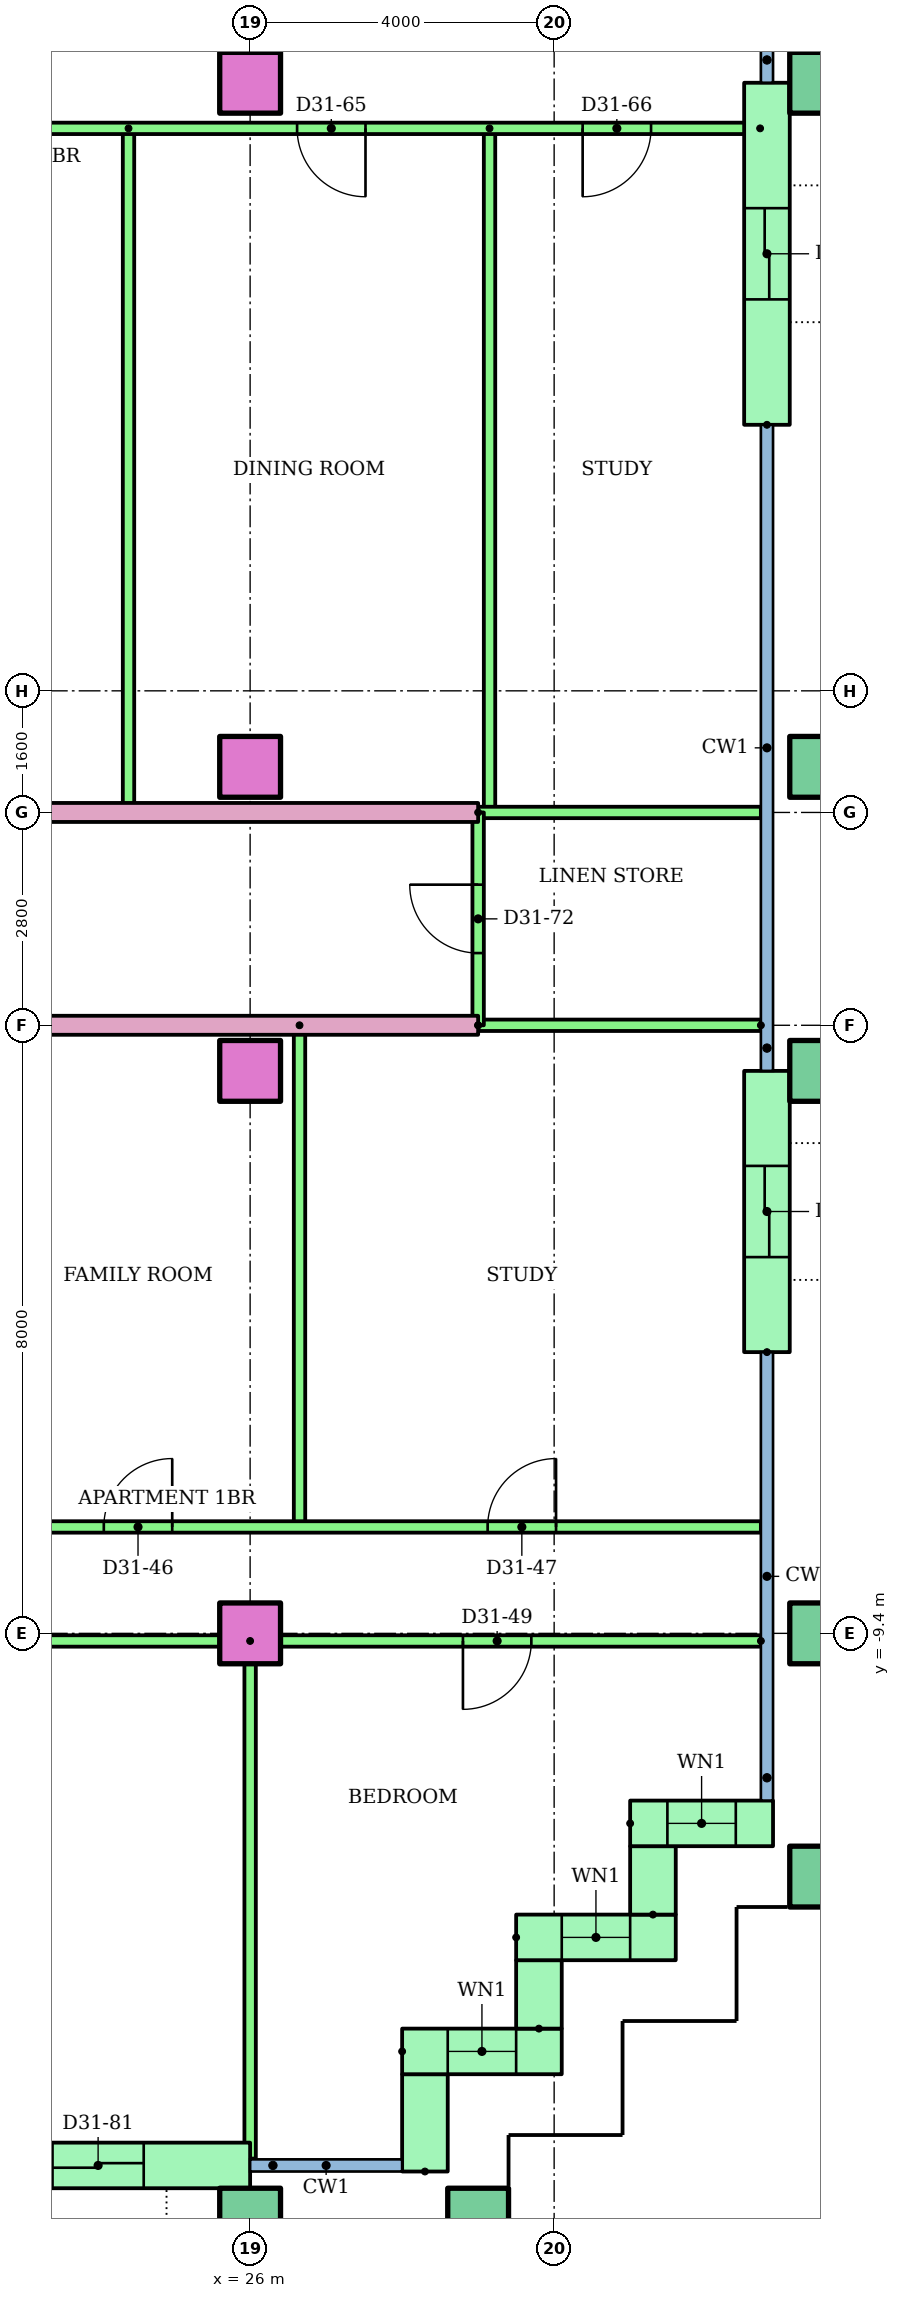
"""IFC4 building model, lengths in metres.
Left out: names, types, materials, properties, quantities, classifications, styles, units other than length and angle.
Written with IfcOpenShell. Run it as: python <this file> out.ifc"""

import sys

from ifc_helpers import new_model, si_unit, direction, frame, frame_2d, origin, origin_2d, place, context, subcontext, project, spatial, rectangle, hollow_rectangle, extrude, element, fill, save


model = new_model("IFC4")
c1 = context("Model", 3, precision=1e-05, world=origin(), true_north=direction((0.0, 1.0)))
c2 = subcontext(c1, "Body", "Model", "MODEL_VIEW")
j1 = project(units=[si_unit("LENGTHUNIT", "METRE"), si_unit("PLANEANGLEUNIT", "RADIAN")], contexts=[c1])
p1 = place(None, origin())
s1 = spatial("IfcSite", under=j1, at=p1, CompositionType="ELEMENT")
p2 = place(p1, origin())
s2 = spatial("IfcBuilding", under=s1, at=p2, CompositionType="ELEMENT")
p3 = place(p2, frame((0.0, 0.0, 123.0)))
s3 = spatial("IfcBuildingStorey", under=s2, at=p3, CompositionType="ELEMENT", Elevation=123.0)
for number, where in (
    (1, (26.0, -17.1, 0.0)),
    (2, (29.0, -17.1, 0.0)),
    (3, (33.5, -12.6, 0.0)),
):
    element("IfcColumn", number, at=place(p3, frame(where)), inside=s3, PredefinedType="COLUMN", context=c2, shape_type="SweptSolid", body=[
        extrude(hollow_rectangle(XDim=0.8, YDim=0.8, WallThickness=0.04, at=origin_2d()), origin(), (0.0, 0.0, 1.0), 3.2),
    ])
p4 = place(p3, frame((26.0, -9.4, 0.0)))
e4 = element("IfcColumn", 4, at=p4, inside=s3, PredefinedType="COLUMN", context=c2, shape_type="SweptSolid", body=[
    extrude(rectangle(XDim=0.8, YDim=0.8, at=origin_2d()), origin(), (0.0, 0.0, 1.0), 3.2),
])
p5 = place(p3, frame((33.5, -9.4, 0.0)))
e5 = element("IfcColumn", 5, at=p5, inside=s3, PredefinedType="COLUMN", context=c2, shape_type="SweptSolid", body=[
    extrude(hollow_rectangle(XDim=0.8, YDim=0.8, WallThickness=0.04, at=origin_2d()), origin(), (0.0, 0.0, 1.0), 3.2),
])
p6 = place(p3, frame((26.0, -2.0, 0.0)))
e6 = element("IfcColumn", 6, at=p6, inside=s3, PredefinedType="COLUMN", context=c2, shape_type="SweptSolid", body=[
    extrude(rectangle(XDim=0.8, YDim=0.8, at=origin_2d()), origin(), (0.0, 0.0, 1.0), 3.2),
])
p7 = place(p3, frame((33.5, -2.0, 0.0)))
e7 = element("IfcColumn", 7, at=p7, inside=s3, PredefinedType="COLUMN", context=c2, shape_type="SweptSolid", body=[
    extrude(hollow_rectangle(XDim=0.8, YDim=0.8, WallThickness=0.04, at=origin_2d()), origin(), (0.0, 0.0, 1.0), 3.2),
])
p8 = place(p3, frame((26.0, 2.0, 0.0)))
e8 = element("IfcColumn", 8, at=p8, inside=s3, PredefinedType="COLUMN", context=c2, shape_type="SweptSolid", body=[
    extrude(rectangle(XDim=0.8, YDim=0.8, at=origin_2d()), origin(), (0.0, 0.0, 1.0), 3.2),
])
p9 = place(p3, frame((33.5, 2.0, 0.0)))
e9 = element("IfcColumn", 9, at=p9, inside=s3, PredefinedType="COLUMN", context=c2, shape_type="SweptSolid", body=[
    extrude(hollow_rectangle(XDim=0.8, YDim=0.8, WallThickness=0.04, at=origin_2d()), origin(), (0.0, 0.0, 1.0), 3.2),
])
p10 = place(p3, frame((26.0, 11.0, 0.0)))
e10 = element("IfcColumn", 10, at=p10, inside=s3, PredefinedType="COLUMN", context=c2, shape_type="SweptSolid", body=[
    extrude(rectangle(XDim=0.8, YDim=0.8, at=origin_2d()), origin(), (0.0, 0.0, 1.0), 3.2),
])
p11 = place(p3, frame((33.5, 11.0, 0.0)))
e11 = element("IfcColumn", 11, at=p11, inside=s3, PredefinedType="COLUMN", context=c2, shape_type="SweptSolid", body=[
    extrude(hollow_rectangle(XDim=0.8, YDim=0.8, WallThickness=0.04, at=origin_2d()), origin(), (0.0, 0.0, 1.0), 3.2),
])
p12 = place(p3, frame((22.0, -16.4, 0.0)))
e12 = element("IfcWall", 12, at=p12, inside=s3, PredefinedType="STANDARD", context=c2, shape_type="SweptSolid", body=[
    extrude(rectangle(XDim=4.0, YDim=0.6, at=frame_2d((2.0, 0.0))), origin(), (0.0, 0.0, 1.0), 2.92),
])
p13 = place(p12, frame((1.4, 0.0, 0.0)))
e13 = element("IfcOpeningElement", 13, at=p13, cuts=e12, PredefinedType="OPENING", context=c2, shape_type="SweptSolid", body=[
    extrude(rectangle(XDim=1.2, YDim=2.1, at=frame_2d((0.6, 1.05))), frame((0.0, 0.31, 0.0), z_axis=(0.0, -1.0, 0.0), x_axis=(1.0, 0.0, 0.0)), (0.0, 0.0, 1.0), 0.62),
])
p14 = place(p3, frame((28.3, -16.48, 0.0), z_axis=(0.0, 0.0, 1.0), x_axis=(0.0, 1.0, 0.0)))
e14 = element("IfcWall", 14, at=p14, inside=s3, PredefinedType="STANDARD", context=c2, shape_type="SweptSolid", body=[
    extrude(rectangle(XDim=1.28, YDim=0.6, at=frame_2d((0.64, 0.0))), origin(), (0.0, 0.0, 1.0), 2.92),
])
p15 = place(p3, frame((28.0, -14.9, 0.0)))
e15 = element("IfcWall", 15, at=p15, inside=s3, PredefinedType="STANDARD", context=c2, shape_type="SweptSolid", body=[
    extrude(rectangle(XDim=2.1, YDim=0.6, at=frame_2d((1.05, 0.0))), origin(), (0.0, 0.0, 1.0), 2.92),
])
p16 = place(p15, frame((0.6, 0.0, 0.9)))
e16 = element("IfcOpeningElement", 16, at=p16, cuts=e15, PredefinedType="OPENING", context=c2, shape_type="SweptSolid", body=[
    extrude(rectangle(XDim=0.9, YDim=1.5, at=frame_2d((0.45, 0.75))), frame((0.0, 0.31, 0.0), z_axis=(0.0, -1.0, 0.0), x_axis=(1.0, 0.0, 0.0)), (0.0, 0.0, 1.0), 0.62),
])
p17 = place(p3, frame((29.8, -14.6, 0.0), z_axis=(0.0, 0.0, 1.0), x_axis=(0.0, 1.0, 0.0)))
e17 = element("IfcWall", 17, at=p17, inside=s3, PredefinedType="STANDARD", context=c2, shape_type="SweptSolid", body=[
    extrude(rectangle(XDim=0.9, YDim=0.6, at=frame_2d((0.45, 0.0))), origin(), (0.0, 0.0, 1.0), 2.92),
])
p18 = place(p3, frame((29.5, -13.4, 0.0)))
e18 = element("IfcWall", 18, at=p18, inside=s3, PredefinedType="STANDARD", context=c2, shape_type="SweptSolid", body=[
    extrude(rectangle(XDim=2.1, YDim=0.6, at=frame_2d((1.05, 0.0))), origin(), (0.0, 0.0, 1.0), 2.92),
])
p19 = place(p18, frame((0.6, 0.0, 0.9)))
e19 = element("IfcOpeningElement", 19, at=p19, cuts=e18, PredefinedType="OPENING", context=c2, shape_type="SweptSolid", body=[
    extrude(rectangle(XDim=0.9, YDim=1.5, at=frame_2d((0.45, 0.75))), frame((0.0, 0.31, 0.0), z_axis=(0.0, -1.0, 0.0), x_axis=(1.0, 0.0, 0.0)), (0.0, 0.0, 1.0), 0.62),
])
p20 = place(p3, frame((31.3, -13.1, 0.0), z_axis=(0.0, 0.0, 1.0), x_axis=(0.0, 1.0, 0.0)))
e20 = element("IfcWall", 20, at=p20, inside=s3, PredefinedType="STANDARD", context=c2, shape_type="SweptSolid", body=[
    extrude(rectangle(XDim=0.9, YDim=0.6, at=frame_2d((0.45, 0.0))), origin(), (0.0, 0.0, 1.0), 2.92),
])
p21 = place(p3, frame((31.0, -11.9, 0.0)))
e21 = element("IfcWall", 21, at=p21, inside=s3, PredefinedType="STANDARD", context=c2, shape_type="SweptSolid", body=[
    extrude(rectangle(XDim=1.88, YDim=0.6, at=frame_2d((0.94, 0.0))), origin(), (0.0, 0.0, 1.0), 2.92),
])
p22 = place(p21, frame((0.49, 0.0, 0.9)))
e22 = element("IfcOpeningElement", 22, at=p22, cuts=e21, PredefinedType="OPENING", context=c2, shape_type="SweptSolid", body=[
    extrude(rectangle(XDim=0.9, YDim=1.5, at=frame_2d((0.45, 0.75))), frame((0.0, 0.31, 0.0), z_axis=(0.0, -1.0, 0.0), x_axis=(1.0, 0.0, 0.0)), (0.0, 0.0, 1.0), 0.62),
])
p23 = place(p3, frame((32.8, -5.7, 0.0), z_axis=(0.0, 0.0, 1.0), x_axis=(0.0, 1.0, 0.0)))
e23 = element("IfcWall", 23, at=p23, inside=s3, PredefinedType="STANDARD", context=c2, shape_type="SweptSolid", body=[
    extrude(rectangle(XDim=3.7, YDim=0.6, at=frame_2d((1.85, 0.0))), origin(), (0.0, 0.0, 1.0), 2.92),
])
p24 = place(p23, frame((1.25, 0.0, 0.0)))
e24 = element("IfcOpeningElement", 24, at=p24, cuts=e23, PredefinedType="OPENING", context=c2, shape_type="SweptSolid", body=[
    extrude(rectangle(XDim=1.2, YDim=2.1, at=frame_2d((0.6, 1.05))), frame((0.0, 0.31, 0.0), z_axis=(0.0, -1.0, 0.0), x_axis=(1.0, 0.0, 0.0)), (0.0, 0.0, 1.0), 0.62),
])
p25 = place(p3, frame((32.8, 6.5, 0.0), z_axis=(0.0, 0.0, 1.0), x_axis=(0.0, 1.0, 0.0)))
e25 = element("IfcWall", 25, at=p25, inside=s3, PredefinedType="STANDARD", context=c2, shape_type="SweptSolid", body=[
    extrude(rectangle(XDim=4.5, YDim=0.6, at=frame_2d((2.25, 0.0))), origin(), (0.0, 0.0, 1.0), 2.92),
])
p26 = place(p25, frame((1.65, 0.0, 0.0)))
e26 = element("IfcOpeningElement", 26, at=p26, cuts=e25, PredefinedType="OPENING", context=c2, shape_type="SweptSolid", body=[
    extrude(rectangle(XDim=1.2, YDim=2.1, at=frame_2d((0.6, 1.05))), frame((0.0, 0.31, 0.0), z_axis=(0.0, -1.0, 0.0), x_axis=(1.0, 0.0, 0.0)), (0.0, 0.0, 1.0), 0.62),
])
p27 = place(p3, frame((26.65, -1.4, 0.0), z_axis=(0.0, 0.0, 1.0), x_axis=(0.0, -1.0, 0.0)))
e27 = element("IfcWall", 27, at=p27, inside=s3, PredefinedType="PARTITIONING", context=c2, shape_type="SweptSolid", body=[
    extrude(rectangle(XDim=6.6, YDim=0.15, at=frame_2d((3.3, 0.0))), origin(), (0.0, 0.0, 1.0), 2.4),
])
p28 = place(p3, frame((20.0, -8.0, 0.0)))
e28 = element("IfcWall", 28, at=p28, inside=s3, PredefinedType="PARTITIONING", context=c2, shape_type="SweptSolid", body=[
    extrude(rectangle(XDim=12.72, YDim=0.15, at=frame_2d((6.36, 0.0))), origin(), (0.0, 0.0, 1.0), 2.4),
])
p29 = place(p28, frame((4.075, 0.0, 0.0)))
e29 = element("IfcOpeningElement", 29, at=p29, cuts=e28, PredefinedType="OPENING", context=c2, shape_type="SweptSolid", body=[
    extrude(rectangle(XDim=0.9, YDim=2.1, at=frame_2d((0.45, 1.05))), frame((0.0, 0.085, 0.0), z_axis=(0.0, -1.0, 0.0), x_axis=(1.0, 0.0, 0.0)), (0.0, 0.0, 1.0), 0.17),
])
p30 = place(p28, frame((9.125, 0.0, 0.0)))
e30 = element("IfcOpeningElement", 30, at=p30, cuts=e28, PredefinedType="OPENING", context=c2, shape_type="SweptSolid", body=[
    extrude(rectangle(XDim=0.9, YDim=2.1, at=frame_2d((0.45, 1.05))), frame((0.0, 0.085, 0.0), z_axis=(0.0, -1.0, 0.0), x_axis=(1.0, 0.0, 0.0)), (0.0, 0.0, 1.0), 0.17),
])
p31 = place(p3, frame((32.72, -9.5, 0.0), z_axis=(0.0, 0.0, 1.0), x_axis=(-1.0, 0.0, 0.0)))
e31 = element("IfcWall", 31, at=p31, inside=s3, PredefinedType="PARTITIONING", context=c2, shape_type="SweptSolid", body=[
    extrude(rectangle(XDim=14.72, YDim=0.15, at=frame_2d((7.36, 0.0))), origin(), (0.0, 0.0, 1.0), 2.4),
])
p32 = place(p31, frame((10.22, 0.0, 0.0)))
e32 = element("IfcOpeningElement", 32, at=p32, cuts=e31, PredefinedType="OPENING", context=c2, shape_type="SweptSolid", body=[
    extrude(rectangle(XDim=1.0, YDim=2.1, at=frame_2d((0.5, 1.05))), frame((0.0, 0.085, 0.0), z_axis=(0.0, -1.0, 0.0), x_axis=(1.0, 0.0, 0.0)), (0.0, 0.0, 1.0), 0.17),
])
p33 = place(p31, frame((3.02, 0.0, 0.0)))
e33 = element("IfcOpeningElement", 33, at=p33, cuts=e31, PredefinedType="OPENING", context=c2, shape_type="SweptSolid", body=[
    extrude(rectangle(XDim=0.9, YDim=2.1, at=frame_2d((0.45, 1.05))), frame((0.0, 0.085, 0.0), z_axis=(0.0, -1.0, 0.0), x_axis=(1.0, 0.0, 0.0)), (0.0, 0.0, 1.0), 0.17),
])
p34 = place(p3, frame((26.0, -9.5, 0.0), z_axis=(0.0, 0.0, 1.0), x_axis=(0.0, -1.0, 0.0)))
e34 = element("IfcWall", 34, at=p34, inside=s3, PredefinedType="PARTITIONING", context=c2, shape_type="SweptSolid", body=[
    extrude(rectangle(XDim=6.81, YDim=0.15, at=frame_2d((3.405, 0.0))), origin(), (0.0, 0.0, 1.0), 2.4),
])
p35 = place(p3, frame((29.0, -1.4, 0.0), z_axis=(0.0, 0.0, 1.0), x_axis=(-1.0, 0.0, 0.0)))
e35 = element("IfcWall", 35, at=p35, inside=s3, PredefinedType="PARTITIONING", context=c2, shape_type="SweptSolid", body=[
    extrude(rectangle(XDim=15.0, YDim=0.25, at=frame_2d((7.5, 0.0))), origin(), (0.0, 0.0, 1.0), 2.4),
])
p36 = place(p35, frame((9.382, 0.0, 0.0)))
e36 = element("IfcOpeningElement", 36, at=p36, cuts=e35, PredefinedType="OPENING", context=c2, shape_type="SweptSolid", body=[
    extrude(rectangle(XDim=1.0, YDim=2.1, at=frame_2d((0.5, 1.05))), frame((0.0, 0.135, 0.0), z_axis=(0.0, -1.0, 0.0), x_axis=(1.0, 0.0, 0.0)), (0.0, 0.0, 1.0), 0.27),
])
p37 = place(p3, frame((32.72, -1.4, 0.0), z_axis=(0.0, 0.0, 1.0), x_axis=(-1.0, 0.0, 0.0)))
e37 = element("IfcWall", 37, at=p37, inside=s3, PredefinedType="PARTITIONING", context=c2, shape_type="SweptSolid", body=[
    extrude(rectangle(XDim=3.72, YDim=0.15, at=frame_2d((1.86, 0.0))), origin(), (0.0, 0.0, 1.0), 2.4),
])
for number, where, z_axis, x_axis in (
    (38, (24.4, 10.4, 0.0), (0.0, 0.0, 1.0), (0.0, -1.0, 0.0)),
    (39, (29.15, 10.4, 0.0), (0.0, 0.0, 1.0), (0.0, -1.0, 0.0)),
):
    element("IfcWall", number, at=place(p3, frame(where, z_axis=z_axis, x_axis=x_axis)), inside=s3, PredefinedType="PARTITIONING", context=c2, shape_type="SweptSolid", body=[
        extrude(rectangle(XDim=9.0, YDim=0.15, at=frame_2d((4.5, 0.0))), origin(), (0.0, 0.0, 1.0), 2.4),
    ])
p38 = place(p3, frame((32.71, 10.4, 0.0), z_axis=(0.0, 0.0, 1.0), x_axis=(-1.0, 0.0, 0.0)))
e40 = element("IfcWall", 40, at=p38, inside=s3, PredefinedType="PARTITIONING", context=c2, shape_type="SweptSolid", body=[
    extrude(rectangle(XDim=16.71, YDim=0.15, at=frame_2d((8.355, 0.0))), origin(), (0.0, 0.0, 1.0), 2.4),
])
p39 = place(p38, frame((10.86, 0.0, 0.0)))
e41 = element("IfcOpeningElement", 41, at=p39, cuts=e40, PredefinedType="OPENING", context=c2, shape_type="SweptSolid", body=[
    extrude(rectangle(XDim=0.9, YDim=2.1, at=frame_2d((0.45, 1.05))), frame((0.0, 0.085, 0.0), z_axis=(0.0, -1.0, 0.0), x_axis=(1.0, 0.0, 0.0)), (0.0, 0.0, 1.0), 0.17),
])
p40 = place(p38, frame((5.192, 0.0, 0.0)))
e42 = element("IfcOpeningElement", 42, at=p40, cuts=e40, PredefinedType="OPENING", context=c2, shape_type="SweptSolid", body=[
    extrude(rectangle(XDim=0.9, YDim=2.1, at=frame_2d((0.45, 1.05))), frame((0.0, 0.085, 0.0), z_axis=(0.0, -1.0, 0.0), x_axis=(1.0, 0.0, 0.0)), (0.0, 0.0, 1.0), 0.17),
])
p41 = place(p38, frame((1.435, 0.0, 0.0)))
e43 = element("IfcOpeningElement", 43, at=p41, cuts=e40, PredefinedType="OPENING", context=c2, shape_type="SweptSolid", body=[
    extrude(rectangle(XDim=0.9, YDim=2.1, at=frame_2d((0.45, 1.05))), frame((0.0, 0.085, 0.0), z_axis=(0.0, -1.0, 0.0), x_axis=(1.0, 0.0, 0.0)), (0.0, 0.0, 1.0), 0.17),
])
p42 = place(p3, frame((14.0, 1.4, 0.0)))
e44 = element("IfcWall", 44, at=p42, inside=s3, PredefinedType="PARTITIONING", context=c2, shape_type="SweptSolid", body=[
    extrude(rectangle(XDim=15.0, YDim=0.25, at=frame_2d((7.5, 0.0))), origin(), (0.0, 0.0, 1.0), 2.4),
])
p43 = place(p42, frame((0.5, 0.0, 0.0)))
e45 = element("IfcOpeningElement", 45, at=p43, cuts=e44, PredefinedType="OPENING", context=c2, shape_type="SweptSolid", body=[
    extrude(rectangle(XDim=1.0, YDim=2.1, at=frame_2d((0.5, 1.05))), frame((0.0, 0.135, 0.0), z_axis=(0.0, -1.0, 0.0), x_axis=(1.0, 0.0, 0.0)), (0.0, 0.0, 1.0), 0.27),
])
p44 = place(p3, frame((29.0, 1.4, 0.0)))
e46 = element("IfcWall", 46, at=p44, inside=s3, PredefinedType="PARTITIONING", context=c2, shape_type="SweptSolid", body=[
    extrude(rectangle(XDim=3.72, YDim=0.15, at=frame_2d((1.86, 0.0))), origin(), (0.0, 0.0, 1.0), 2.4),
])
p45 = place(p3, frame((29.0, -1.4, 0.0), z_axis=(0.0, 0.0, 1.0), x_axis=(0.0, 1.0, 0.0)))
e47 = element("IfcWall", 47, at=p45, inside=s3, PredefinedType="PARTITIONING", context=c2, shape_type="SweptSolid", body=[
    extrude(rectangle(XDim=2.8, YDim=0.15, at=frame_2d((1.4, 0.0))), origin(), (0.0, 0.0, 1.0), 2.4),
])
p46 = place(p45, frame((0.95, 0.0, 0.0)))
e48 = element("IfcOpeningElement", 48, at=p46, cuts=e47, PredefinedType="OPENING", context=c2, shape_type="SweptSolid", body=[
    extrude(rectangle(XDim=0.9, YDim=2.1, at=frame_2d((0.45, 1.05))), frame((0.0, 0.085, 0.0), z_axis=(0.0, -1.0, 0.0), x_axis=(1.0, 0.0, 0.0)), (0.0, 0.0, 1.0), 0.17),
])
p47 = place(p16, origin())
e49 = element("IfcWindow", 49, at=p47, inside=s3, PartitioningType="SINGLE_PANEL", PredefinedType="WINDOW", context=c2, shape_type="SweptSolid", body=[
    extrude(rectangle(XDim=0.9, YDim=1.5, at=frame_2d((0.45, 0.75))), frame((0.0, 0.03, 0.0), z_axis=(0.0, -1.0, 0.0), x_axis=(1.0, 0.0, 0.0)), (0.0, 0.0, 1.0), 0.06),
])
fill(e16, e49)
p48 = place(p19, origin())
e50 = element("IfcWindow", 50, at=p48, inside=s3, PartitioningType="SINGLE_PANEL", PredefinedType="WINDOW", context=c2, shape_type="SweptSolid", body=[
    extrude(rectangle(XDim=0.9, YDim=1.5, at=frame_2d((0.45, 0.75))), frame((0.0, 0.03, 0.0), z_axis=(0.0, -1.0, 0.0), x_axis=(1.0, 0.0, 0.0)), (0.0, 0.0, 1.0), 0.06),
])
fill(e19, e50)
p49 = place(p22, origin())
e51 = element("IfcWindow", 51, at=p49, inside=s3, PartitioningType="SINGLE_PANEL", PredefinedType="WINDOW", context=c2, shape_type="SweptSolid", body=[
    extrude(rectangle(XDim=0.9, YDim=1.5, at=frame_2d((0.45, 0.75))), frame((0.0, 0.03, 0.0), z_axis=(0.0, -1.0, 0.0), x_axis=(1.0, 0.0, 0.0)), (0.0, 0.0, 1.0), 0.06),
])
fill(e22, e51)
p50 = place(p29, origin())
e52 = element("IfcDoor", 52, at=p50, inside=s3, OperationType="SINGLE_SWING_RIGHT", PredefinedType="DOOR", context=c2, shape_type="SweptSolid", body=[
    extrude(rectangle(XDim=0.9, YDim=2.1, at=frame_2d((0.45, 1.05))), frame((0.0, 0.025, 0.0), z_axis=(0.0, -1.0, 0.0), x_axis=(1.0, 0.0, 0.0)), (0.0, 0.0, 1.0), 0.05),
])
fill(e29, e52)
p51 = place(p30, origin())
e53 = element("IfcDoor", 53, at=p51, inside=s3, OperationType="SINGLE_SWING_RIGHT", PredefinedType="DOOR", context=c2, shape_type="SweptSolid", body=[
    extrude(rectangle(XDim=0.9, YDim=2.1, at=frame_2d((0.45, 1.05))), frame((0.0, 0.025, 0.0), z_axis=(0.0, -1.0, 0.0), x_axis=(1.0, 0.0, 0.0)), (0.0, 0.0, 1.0), 0.05),
])
fill(e30, e53)
p52 = place(p33, origin())
e54 = element("IfcDoor", 54, at=p52, inside=s3, OperationType="SINGLE_SWING_RIGHT", PredefinedType="DOOR", context=c2, shape_type="SweptSolid", body=[
    extrude(rectangle(XDim=0.9, YDim=2.1, at=frame_2d((0.45, 1.05))), frame((0.0, 0.025, 0.0), z_axis=(0.0, -1.0, 0.0), x_axis=(1.0, 0.0, 0.0)), (0.0, 0.0, 1.0), 0.05),
])
fill(e33, e54)
p53 = place(p40, origin())
e55 = element("IfcDoor", 55, at=p53, inside=s3, OperationType="SINGLE_SWING_LEFT", PredefinedType="DOOR", context=c2, shape_type="SweptSolid", body=[
    extrude(rectangle(XDim=0.9, YDim=2.1, at=frame_2d((0.45, 1.05))), frame((0.0, 0.025, 0.0), z_axis=(0.0, -1.0, 0.0), x_axis=(1.0, 0.0, 0.0)), (0.0, 0.0, 1.0), 0.05),
])
fill(e42, e55)
p54 = place(p41, origin())
e56 = element("IfcDoor", 56, at=p54, inside=s3, OperationType="SINGLE_SWING_RIGHT", PredefinedType="DOOR", context=c2, shape_type="SweptSolid", body=[
    extrude(rectangle(XDim=0.9, YDim=2.1, at=frame_2d((0.45, 1.05))), frame((0.0, 0.025, 0.0), z_axis=(0.0, -1.0, 0.0), x_axis=(1.0, 0.0, 0.0)), (0.0, 0.0, 1.0), 0.05),
])
fill(e43, e56)
p55 = place(p46, origin())
e57 = element("IfcDoor", 57, at=p55, inside=s3, OperationType="SINGLE_SWING_RIGHT", PredefinedType="DOOR", context=c2, shape_type="SweptSolid", body=[
    extrude(rectangle(XDim=0.9, YDim=2.1, at=frame_2d((0.45, 1.05))), frame((0.0, 0.025, 0.0), z_axis=(0.0, -1.0, 0.0), x_axis=(1.0, 0.0, 0.0)), (0.0, 0.0, 1.0), 0.05),
])
fill(e48, e57)
p56 = place(p13, origin())
e58 = element("IfcDoor", 58, at=p56, inside=s3, OperationType="SLIDING_TO_LEFT", PredefinedType="DOOR", context=c2, shape_type="SweptSolid", body=[
    extrude(rectangle(XDim=1.2, YDim=2.1, at=frame_2d((0.6, 1.05))), frame((0.0, 0.025, 0.0), z_axis=(0.0, -1.0, 0.0), x_axis=(1.0, 0.0, 0.0)), (0.0, 0.0, 1.0), 0.05),
])
fill(e13, e58)
p57 = place(p24, origin())
e59 = element("IfcDoor", 59, at=p57, inside=s3, OperationType="SLIDING_TO_LEFT", PredefinedType="DOOR", context=c2, shape_type="SweptSolid", body=[
    extrude(rectangle(XDim=1.2, YDim=2.1, at=frame_2d((0.6, 1.05))), frame((0.0, 0.025, 0.0), z_axis=(0.0, -1.0, 0.0), x_axis=(1.0, 0.0, 0.0)), (0.0, 0.0, 1.0), 0.05),
])
fill(e24, e59)
p58 = place(p26, origin())
e60 = element("IfcDoor", 60, at=p58, inside=s3, OperationType="SLIDING_TO_LEFT", PredefinedType="DOOR", context=c2, shape_type="SweptSolid", body=[
    extrude(rectangle(XDim=1.2, YDim=2.1, at=frame_2d((0.6, 1.05))), frame((0.0, 0.025, 0.0), z_axis=(0.0, -1.0, 0.0), x_axis=(1.0, 0.0, 0.0)), (0.0, 0.0, 1.0), 0.05),
])
fill(e26, e60)
save(model, sys.argv[1])
